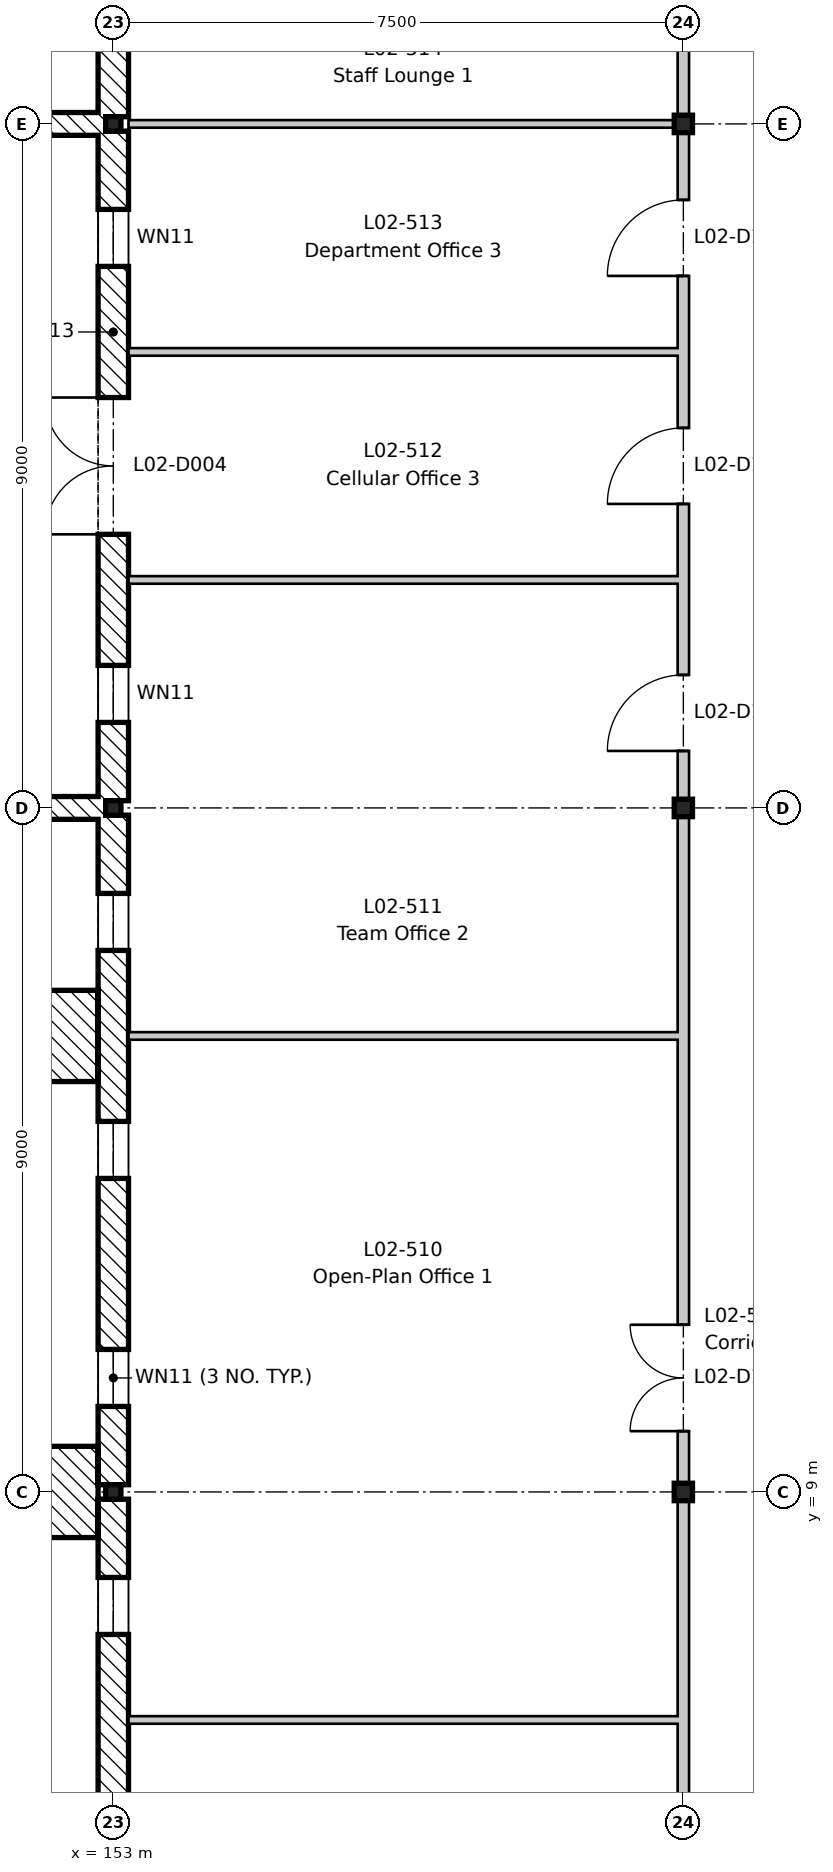
"""IFC4 building model, lengths in metres.
Left out: names, types, materials, properties, quantities, classifications, styles, units other than length and angle.
Written with IfcOpenShell. Run it as: python <this file> out.ifc"""

import sys

from ifc_helpers import new_model, si_unit, direction, frame, frame_2d, origin, origin_2d, place, context, subcontext, project, spatial, rectangle, i_section, extrude, element, fill, save


model = new_model("IFC4")
c1 = context("Model", 3, precision=1e-05, world=origin(), true_north=direction((0.0, 1.0)))
c2 = subcontext(c1, "Body", "Model", "MODEL_VIEW")
j1 = project(units=[si_unit("LENGTHUNIT", "METRE"), si_unit("PLANEANGLEUNIT", "RADIAN")], contexts=[c1])
p1 = place(None, origin())
s1 = spatial("IfcSite", under=j1, at=p1, CompositionType="ELEMENT")
p2 = place(p1, origin())
s2 = spatial("IfcBuilding", under=s1, at=p2, CompositionType="ELEMENT")
p3 = place(p2, frame((0.0, 0.0, 9.9)))
s3 = spatial("IfcBuildingStorey", under=s2, at=p3, CompositionType="ELEMENT", Elevation=9.9)
for number, where, z_axis, x_axis in (
    (1, (153.0, 9.0, -0.2), (0.0, 0.0, 1.0), (1.0, 0.0, 0.0)),
    (2, (153.0, 18.0, -0.2), (0.0, 0.0, 1.0), (1.0, 0.0, 0.0)),
    (3, (153.0, 27.0, -0.2), (0.0, 0.0, 1.0), (1.0, 0.0, 0.0)),
):
    element("IfcColumn", number, at=place(p3, frame(where, z_axis=z_axis, x_axis=x_axis)), inside=s3, PredefinedType="COLUMN", context=c2, shape_type="SweptSolid", body=[
        extrude(i_section(OverallWidth=0.2, OverallDepth=0.19, WebThickness=0.007, FlangeThickness=0.01, FilletRadius=0.018, at=origin_2d()), origin(), (0.0, 0.0, 1.0), 4.45),
    ])
for number, where, z_axis, x_axis in (
    (4, (160.5, 9.0, -0.2), (0.0, 0.0, 1.0), (1.0, 0.0, 0.0)),
    (5, (160.5, 18.0, -0.2), (0.0, 0.0, 1.0), (1.0, 0.0, 0.0)),
    (6, (160.5, 27.0, -0.2), (0.0, 0.0, 1.0), (1.0, 0.0, 0.0)),
):
    element("IfcColumn", number, at=place(p3, frame(where, z_axis=z_axis, x_axis=x_axis)), inside=s3, PredefinedType="COLUMN", context=c2, shape_type="SweptSolid", body=[
        extrude(i_section(OverallWidth=0.24, OverallDepth=0.23, WebThickness=0.008, FlangeThickness=0.012, FilletRadius=0.021, at=origin_2d()), origin(), (0.0, 0.0, 1.0), 4.45),
    ])
p4 = place(p3, frame((153.0, 0.095, 0.0), z_axis=(0.0, 0.0, 1.0), x_axis=(0.0, 1.0, 0.0)))
e7 = element("IfcWall", 7, at=p4, inside=s3, PredefinedType="STANDARD", context=c2, shape_type="SweptSolid", body=[
    extrude(rectangle(XDim=8.81, YDim=0.4, at=frame_2d((4.405, 0.0))), origin(), (0.0, 0.0, 1.0), 3.85),
])
p5 = place(p4, frame((1.03, 0.0, 1.5)))
e8 = element("IfcOpeningElement", 8, at=p5, cuts=e7, PredefinedType="OPENING", context=c2, shape_type="SweptSolid", body=[
    extrude(rectangle(XDim=0.75, YDim=1.2, at=frame_2d((0.375, 0.6))), frame((0.0, 0.21, 0.0), z_axis=(0.0, -1.0, 0.0), x_axis=(1.0, 0.0, 0.0)), (0.0, 0.0, 1.0), 0.42),
])
p6 = place(p4, frame((4.03, 0.0, 1.5)))
e9 = element("IfcOpeningElement", 9, at=p6, cuts=e7, PredefinedType="OPENING", context=c2, shape_type="SweptSolid", body=[
    extrude(rectangle(XDim=0.75, YDim=1.2, at=frame_2d((0.375, 0.6))), frame((0.0, 0.21, 0.0), z_axis=(0.0, -1.0, 0.0), x_axis=(1.0, 0.0, 0.0)), (0.0, 0.0, 1.0), 0.42),
])
p7 = place(p4, frame((7.03, 0.0, 1.5)))
e10 = element("IfcOpeningElement", 10, at=p7, cuts=e7, PredefinedType="OPENING", context=c2, shape_type="SweptSolid", body=[
    extrude(rectangle(XDim=0.75, YDim=1.2, at=frame_2d((0.375, 0.6))), frame((0.0, 0.21, 0.0), z_axis=(0.0, -1.0, 0.0), x_axis=(1.0, 0.0, 0.0)), (0.0, 0.0, 1.0), 0.42),
])
p8 = place(p3, frame((153.0, 9.095, 0.0), z_axis=(0.0, 0.0, 1.0), x_axis=(0.0, 1.0, 0.0)))
e11 = element("IfcWall", 11, at=p8, inside=s3, PredefinedType="STANDARD", context=c2, shape_type="SweptSolid", body=[
    extrude(rectangle(XDim=8.81, YDim=0.4, at=frame_2d((4.405, 0.0))), origin(), (0.0, 0.0, 1.0), 3.85),
])
p9 = place(p8, frame((1.03, 0.0, 1.5)))
e12 = element("IfcOpeningElement", 12, at=p9, cuts=e11, PredefinedType="OPENING", context=c2, shape_type="SweptSolid", body=[
    extrude(rectangle(XDim=0.75, YDim=1.2, at=frame_2d((0.375, 0.6))), frame((0.0, 0.21, 0.0), z_axis=(0.0, -1.0, 0.0), x_axis=(1.0, 0.0, 0.0)), (0.0, 0.0, 1.0), 0.42),
])
p10 = place(p8, frame((4.03, 0.0, 1.5)))
e13 = element("IfcOpeningElement", 13, at=p10, cuts=e11, PredefinedType="OPENING", context=c2, shape_type="SweptSolid", body=[
    extrude(rectangle(XDim=0.75, YDim=1.2, at=frame_2d((0.375, 0.6))), frame((0.0, 0.21, 0.0), z_axis=(0.0, -1.0, 0.0), x_axis=(1.0, 0.0, 0.0)), (0.0, 0.0, 1.0), 0.42),
])
p11 = place(p8, frame((7.03, 0.0, 1.5)))
e14 = element("IfcOpeningElement", 14, at=p11, cuts=e11, PredefinedType="OPENING", context=c2, shape_type="SweptSolid", body=[
    extrude(rectangle(XDim=0.75, YDim=1.2, at=frame_2d((0.375, 0.6))), frame((0.0, 0.21, 0.0), z_axis=(0.0, -1.0, 0.0), x_axis=(1.0, 0.0, 0.0)), (0.0, 0.0, 1.0), 0.42),
])
p12 = place(p3, frame((153.0, 18.095, 0.0), z_axis=(0.0, 0.0, 1.0), x_axis=(0.0, 1.0, 0.0)))
e15 = element("IfcWall", 15, at=p12, inside=s3, PredefinedType="STANDARD", context=c2, shape_type="SweptSolid", body=[
    extrude(rectangle(XDim=8.81, YDim=0.4, at=frame_2d((4.405, 0.0))), origin(), (0.0, 0.0, 1.0), 3.85),
])
p13 = place(p12, frame((3.505, 0.0, 0.0)))
e16 = element("IfcOpeningElement", 16, at=p13, cuts=e15, PredefinedType="OPENING", context=c2, shape_type="SweptSolid", body=[
    extrude(rectangle(XDim=1.8, YDim=2.4, at=frame_2d((0.9, 1.2))), frame((0.0, 0.21, 0.0), z_axis=(0.0, -1.0, 0.0), x_axis=(1.0, 0.0, 0.0)), (0.0, 0.0, 1.0), 0.42),
])
p14 = place(p12, frame((1.03, 0.0, 1.5)))
e17 = element("IfcOpeningElement", 17, at=p14, cuts=e15, PredefinedType="OPENING", context=c2, shape_type="SweptSolid", body=[
    extrude(rectangle(XDim=0.75, YDim=1.2, at=frame_2d((0.375, 0.6))), frame((0.0, 0.21, 0.0), z_axis=(0.0, -1.0, 0.0), x_axis=(1.0, 0.0, 0.0)), (0.0, 0.0, 1.0), 0.42),
])
p15 = place(p12, frame((7.03, 0.0, 1.5)))
e18 = element("IfcOpeningElement", 18, at=p15, cuts=e15, PredefinedType="OPENING", context=c2, shape_type="SweptSolid", body=[
    extrude(rectangle(XDim=0.75, YDim=1.2, at=frame_2d((0.375, 0.6))), frame((0.0, 0.21, 0.0), z_axis=(0.0, -1.0, 0.0), x_axis=(1.0, 0.0, 0.0)), (0.0, 0.0, 1.0), 0.42),
])
p16 = place(p3, frame((153.0, 27.095, 0.0), z_axis=(0.0, 0.0, 1.0), x_axis=(0.0, 1.0, 0.0)))
e19 = element("IfcWall", 19, at=p16, inside=s3, PredefinedType="STANDARD", context=c2, shape_type="SweptSolid", body=[
    extrude(rectangle(XDim=8.81, YDim=0.4, at=frame_2d((4.405, 0.0))), origin(), (0.0, 0.0, 1.0), 3.85),
])
p17 = place(p16, frame((3.505, 0.0, 0.0)))
e20 = element("IfcOpeningElement", 20, at=p17, cuts=e19, PredefinedType="OPENING", context=c2, shape_type="SweptSolid", body=[
    extrude(rectangle(XDim=1.8, YDim=2.4, at=frame_2d((0.9, 1.2))), frame((0.0, 0.21, 0.0), z_axis=(0.0, -1.0, 0.0), x_axis=(1.0, 0.0, 0.0)), (0.0, 0.0, 1.0), 0.42),
])
p18 = place(p16, frame((1.03, 0.0, 1.5)))
e21 = element("IfcOpeningElement", 21, at=p18, cuts=e19, PredefinedType="OPENING", context=c2, shape_type="SweptSolid", body=[
    extrude(rectangle(XDim=0.75, YDim=1.2, at=frame_2d((0.375, 0.6))), frame((0.0, 0.21, 0.0), z_axis=(0.0, -1.0, 0.0), x_axis=(1.0, 0.0, 0.0)), (0.0, 0.0, 1.0), 0.42),
])
p19 = place(p16, frame((7.03, 0.0, 1.5)))
e22 = element("IfcOpeningElement", 22, at=p19, cuts=e19, PredefinedType="OPENING", context=c2, shape_type="SweptSolid", body=[
    extrude(rectangle(XDim=0.75, YDim=1.2, at=frame_2d((0.375, 0.6))), frame((0.0, 0.21, 0.0), z_axis=(0.0, -1.0, 0.0), x_axis=(1.0, 0.0, 0.0)), (0.0, 0.0, 1.0), 0.42),
])
for number, where, z_axis, x_axis in (
    (23, (152.2, 8.4, 0.0), (0.0, 0.0, 1.0), (0.0, 1.0, 0.0)),
    (24, (152.2, 14.4, 0.0), (0.0, 0.0, 1.0), (0.0, 1.0, 0.0)),
):
    element("IfcWall", number, at=place(p3, frame(where, z_axis=z_axis, x_axis=x_axis)), inside=s3, PredefinedType="STANDARD", context=c2, shape_type="SweptSolid", body=[
        extrude(rectangle(XDim=1.2, YDim=1.2, at=frame_2d((0.6, 0.0))), origin(), (0.0, 0.0, 1.0), 3.65),
    ])
for number, where, z_axis, x_axis in (
    (25, (152.9, 18.0, 0.0), (0.0, 0.0, 1.0), (-1.0, 0.0, 0.0)),
    (26, (152.9, 27.0, 0.0), (0.0, 0.0, 1.0), (-1.0, 0.0, 0.0)),
):
    element("IfcWall", number, at=place(p3, frame(where, z_axis=z_axis, x_axis=x_axis)), inside=s3, PredefinedType="STANDARD", context=c2, shape_type="SweptSolid", body=[
        extrude(rectangle(XDim=2.9, YDim=0.3, at=frame_2d((1.45, 0.0))), origin(), (0.0, 0.0, 1.0), 3.97),
    ])
for number, where, z_axis, x_axis in (
    (27, (153.2, 6.0, 0.0), (0.0, 0.0, 1.0), (1.0, 0.0, 0.0)),
    (28, (153.2, 15.0, 0.0), (0.0, 0.0, 1.0), (1.0, 0.0, 0.0)),
    (29, (153.2, 21.0, 0.0), (0.0, 0.0, 1.0), (1.0, 0.0, 0.0)),
    (30, (153.2, 24.0, 0.0), (0.0, 0.0, 1.0), (1.0, 0.0, 0.0)),
):
    element("IfcWall", number, at=place(p3, frame(where, z_axis=z_axis, x_axis=x_axis)), inside=s3, PredefinedType="PARTITIONING", context=c2, shape_type="SweptSolid", body=[
        extrude(rectangle(XDim=7.225, YDim=0.1, at=frame_2d((3.613, 0.0))), origin(), (0.0, 0.0, 1.0), 4.25),
    ])
p20 = place(p3, frame((153.2, 27.0, 0.0), z_axis=(0.0, 0.0, 1.0), x_axis=(1.0, 0.0, 0.0)))
e31 = element("IfcWall", 31, at=p20, inside=s3, PredefinedType="PARTITIONING", context=c2, shape_type="SweptSolid", body=[
    extrude(rectangle(XDim=7.225, YDim=0.1, at=frame_2d((3.613, 0.0))), origin(), (0.0, 0.0, 1.0), 3.9),
])
p21 = place(p3, frame((160.5, -8.8, 0.0), z_axis=(0.0, 0.0, 1.0), x_axis=(0.0, 1.0, 0.0)))
e32 = element("IfcWall", 32, at=p21, inside=s3, PredefinedType="PARTITIONING", context=c2, shape_type="SweptSolid", body=[
    extrude(rectangle(XDim=62.6, YDim=0.15, at=frame_2d((31.3, 0.0))), origin(), (0.0, 0.0, 1.0), 3.73),
])
p22 = place(p21, frame((0.8, 0.0, 0.0)))
e33 = element("IfcOpeningElement", 33, at=p22, cuts=e32, PredefinedType="OPENING", context=c2, shape_type="SweptSolid", body=[
    extrude(rectangle(XDim=1.0, YDim=2.1, at=frame_2d((0.5, 1.05))), frame((0.0, 0.085, 0.0), z_axis=(0.0, -1.0, 0.0), x_axis=(1.0, 0.0, 0.0)), (0.0, 0.0, 1.0), 0.17),
])
p23 = place(p21, frame((5.3, 0.0, 0.0)))
e34 = element("IfcOpeningElement", 34, at=p23, cuts=e32, PredefinedType="OPENING", context=c2, shape_type="SweptSolid", body=[
    extrude(rectangle(XDim=1.0, YDim=2.1, at=frame_2d((0.5, 1.05))), frame((0.0, 0.085, 0.0), z_axis=(0.0, -1.0, 0.0), x_axis=(1.0, 0.0, 0.0)), (0.0, 0.0, 1.0), 0.17),
])
p24 = place(p21, frame((9.8, 0.0, 0.0)))
e35 = element("IfcOpeningElement", 35, at=p24, cuts=e32, PredefinedType="OPENING", context=c2, shape_type="SweptSolid", body=[
    extrude(rectangle(XDim=1.0, YDim=2.1, at=frame_2d((0.5, 1.05))), frame((0.0, 0.085, 0.0), z_axis=(0.0, -1.0, 0.0), x_axis=(1.0, 0.0, 0.0)), (0.0, 0.0, 1.0), 0.17),
])
p25 = place(p21, frame((12.8, 0.0, 0.0)))
e36 = element("IfcOpeningElement", 36, at=p25, cuts=e32, PredefinedType="OPENING", context=c2, shape_type="SweptSolid", body=[
    extrude(rectangle(XDim=1.0, YDim=2.1, at=frame_2d((0.5, 1.05))), frame((0.0, 0.085, 0.0), z_axis=(0.0, -1.0, 0.0), x_axis=(1.0, 0.0, 0.0)), (0.0, 0.0, 1.0), 0.17),
])
p26 = place(p21, frame((18.6, 0.0, 0.0)))
e37 = element("IfcOpeningElement", 37, at=p26, cuts=e32, PredefinedType="OPENING", context=c2, shape_type="SweptSolid", body=[
    extrude(rectangle(XDim=1.4, YDim=2.1, at=frame_2d((0.7, 1.05))), frame((0.0, 0.085, 0.0), z_axis=(0.0, -1.0, 0.0), x_axis=(1.0, 0.0, 0.0)), (0.0, 0.0, 1.0), 0.17),
])
p27 = place(p21, frame((27.55, 0.0, 0.0)))
e38 = element("IfcOpeningElement", 38, at=p27, cuts=e32, PredefinedType="OPENING", context=c2, shape_type="SweptSolid", body=[
    extrude(rectangle(XDim=1.0, YDim=2.1, at=frame_2d((0.5, 1.05))), frame((0.0, 0.085, 0.0), z_axis=(0.0, -1.0, 0.0), x_axis=(1.0, 0.0, 0.0)), (0.0, 0.0, 1.0), 0.17),
])
p28 = place(p21, frame((30.8, 0.0, 0.0)))
e39 = element("IfcOpeningElement", 39, at=p28, cuts=e32, PredefinedType="OPENING", context=c2, shape_type="SweptSolid", body=[
    extrude(rectangle(XDim=1.0, YDim=2.1, at=frame_2d((0.5, 1.05))), frame((0.0, 0.085, 0.0), z_axis=(0.0, -1.0, 0.0), x_axis=(1.0, 0.0, 0.0)), (0.0, 0.0, 1.0), 0.17),
])
p29 = place(p21, frame((33.8, 0.0, 0.0)))
e40 = element("IfcOpeningElement", 40, at=p29, cuts=e32, PredefinedType="OPENING", context=c2, shape_type="SweptSolid", body=[
    extrude(rectangle(XDim=1.0, YDim=2.1, at=frame_2d((0.5, 1.05))), frame((0.0, 0.085, 0.0), z_axis=(0.0, -1.0, 0.0), x_axis=(1.0, 0.0, 0.0)), (0.0, 0.0, 1.0), 0.17),
])
p30 = place(p21, frame((38.3, 0.0, 0.0)))
e41 = element("IfcOpeningElement", 41, at=p30, cuts=e32, PredefinedType="OPENING", context=c2, shape_type="SweptSolid", body=[
    extrude(rectangle(XDim=1.0, YDim=2.1, at=frame_2d((0.5, 1.05))), frame((0.0, 0.085, 0.0), z_axis=(0.0, -1.0, 0.0), x_axis=(1.0, 0.0, 0.0)), (0.0, 0.0, 1.0), 0.17),
])
p31 = place(p21, frame((42.8, 0.0, 0.0)))
e42 = element("IfcOpeningElement", 42, at=p31, cuts=e32, PredefinedType="OPENING", context=c2, shape_type="SweptSolid", body=[
    extrude(rectangle(XDim=1.0, YDim=2.1, at=frame_2d((0.5, 1.05))), frame((0.0, 0.085, 0.0), z_axis=(0.0, -1.0, 0.0), x_axis=(1.0, 0.0, 0.0)), (0.0, 0.0, 1.0), 0.17),
])
p32 = place(p21, frame((45.8, 0.0, 0.0)))
e43 = element("IfcOpeningElement", 43, at=p32, cuts=e32, PredefinedType="OPENING", context=c2, shape_type="SweptSolid", body=[
    extrude(rectangle(XDim=1.0, YDim=2.1, at=frame_2d((0.5, 1.05))), frame((0.0, 0.085, 0.0), z_axis=(0.0, -1.0, 0.0), x_axis=(1.0, 0.0, 0.0)), (0.0, 0.0, 1.0), 0.17),
])
p33 = place(p21, frame((50.3, 0.0, 0.0)))
e44 = element("IfcOpeningElement", 44, at=p33, cuts=e32, PredefinedType="OPENING", context=c2, shape_type="SweptSolid", body=[
    extrude(rectangle(XDim=1.0, YDim=2.1, at=frame_2d((0.5, 1.05))), frame((0.0, 0.085, 0.0), z_axis=(0.0, -1.0, 0.0), x_axis=(1.0, 0.0, 0.0)), (0.0, 0.0, 1.0), 0.17),
])
p34 = place(p21, frame((54.8, 0.0, 0.0)))
e45 = element("IfcOpeningElement", 45, at=p34, cuts=e32, PredefinedType="OPENING", context=c2, shape_type="SweptSolid", body=[
    extrude(rectangle(XDim=1.0, YDim=2.1, at=frame_2d((0.5, 1.05))), frame((0.0, 0.085, 0.0), z_axis=(0.0, -1.0, 0.0), x_axis=(1.0, 0.0, 0.0)), (0.0, 0.0, 1.0), 0.17),
])
p35 = place(p21, frame((57.8, 0.0, 0.0)))
e46 = element("IfcOpeningElement", 46, at=p35, cuts=e32, PredefinedType="OPENING", context=c2, shape_type="SweptSolid", body=[
    extrude(rectangle(XDim=1.0, YDim=2.1, at=frame_2d((0.5, 1.05))), frame((0.0, 0.085, 0.0), z_axis=(0.0, -1.0, 0.0), x_axis=(1.0, 0.0, 0.0)), (0.0, 0.0, 1.0), 0.17),
])
p36 = place(p21, frame((60.8, 0.0, 0.0)))
e47 = element("IfcOpeningElement", 47, at=p36, cuts=e32, PredefinedType="OPENING", context=c2, shape_type="SweptSolid", body=[
    extrude(rectangle(XDim=1.0, YDim=2.1, at=frame_2d((0.5, 1.05))), frame((0.0, 0.085, 0.0), z_axis=(0.0, -1.0, 0.0), x_axis=(1.0, 0.0, 0.0)), (0.0, 0.0, 1.0), 0.17),
])
p37 = place(p7, origin())
e48 = element("IfcWindow", 48, at=p37, inside=s3, PartitioningType="SINGLE_PANEL", PredefinedType="WINDOW", context=c2, shape_type="SweptSolid", body=[
    extrude(rectangle(XDim=0.75, YDim=1.2, at=frame_2d((0.375, 0.6))), frame((0.0, -0.12, 0.0), z_axis=(0.0, -1.0, 0.0), x_axis=(1.0, 0.0, 0.0)), (0.0, 0.0, 1.0), 0.06),
])
fill(e10, e48)
p38 = place(p9, origin())
e49 = element("IfcWindow", 49, at=p38, inside=s3, PartitioningType="SINGLE_PANEL", PredefinedType="WINDOW", context=c2, shape_type="SweptSolid", body=[
    extrude(rectangle(XDim=0.75, YDim=1.2, at=frame_2d((0.375, 0.6))), frame((0.0, -0.12, 0.0), z_axis=(0.0, -1.0, 0.0), x_axis=(1.0, 0.0, 0.0)), (0.0, 0.0, 1.0), 0.06),
])
fill(e12, e49)
p39 = place(p10, origin())
e50 = element("IfcWindow", 50, at=p39, inside=s3, PartitioningType="SINGLE_PANEL", PredefinedType="WINDOW", context=c2, shape_type="SweptSolid", body=[
    extrude(rectangle(XDim=0.75, YDim=1.2, at=frame_2d((0.375, 0.6))), frame((0.0, -0.12, 0.0), z_axis=(0.0, -1.0, 0.0), x_axis=(1.0, 0.0, 0.0)), (0.0, 0.0, 1.0), 0.06),
])
fill(e13, e50)
p40 = place(p11, origin())
e51 = element("IfcWindow", 51, at=p40, inside=s3, PartitioningType="SINGLE_PANEL", PredefinedType="WINDOW", context=c2, shape_type="SweptSolid", body=[
    extrude(rectangle(XDim=0.75, YDim=1.2, at=frame_2d((0.375, 0.6))), frame((0.0, -0.12, 0.0), z_axis=(0.0, -1.0, 0.0), x_axis=(1.0, 0.0, 0.0)), (0.0, 0.0, 1.0), 0.06),
])
fill(e14, e51)
p41 = place(p13, origin())
e52 = element("IfcDoor", 52, at=p41, inside=s3, OperationType="DOUBLE_DOOR_SINGLE_SWING", PredefinedType="DOOR", context=c2, shape_type="SweptSolid", body=[
    extrude(rectangle(XDim=1.8, YDim=2.4, at=frame_2d((0.9, 1.2))), frame((0.0, 0.025, 0.0), z_axis=(0.0, -1.0, 0.0), x_axis=(1.0, 0.0, 0.0)), (0.0, 0.0, 1.0), 0.05),
])
fill(e16, e52)
p42 = place(p14, origin())
e53 = element("IfcWindow", 53, at=p42, inside=s3, PartitioningType="SINGLE_PANEL", PredefinedType="WINDOW", context=c2, shape_type="SweptSolid", body=[
    extrude(rectangle(XDim=0.75, YDim=1.2, at=frame_2d((0.375, 0.6))), frame((0.0, -0.12, 0.0), z_axis=(0.0, -1.0, 0.0), x_axis=(1.0, 0.0, 0.0)), (0.0, 0.0, 1.0), 0.06),
])
fill(e17, e53)
p43 = place(p15, origin())
e54 = element("IfcWindow", 54, at=p43, inside=s3, PartitioningType="SINGLE_PANEL", PredefinedType="WINDOW", context=c2, shape_type="SweptSolid", body=[
    extrude(rectangle(XDim=0.75, YDim=1.2, at=frame_2d((0.375, 0.6))), frame((0.0, -0.12, 0.0), z_axis=(0.0, -1.0, 0.0), x_axis=(1.0, 0.0, 0.0)), (0.0, 0.0, 1.0), 0.06),
])
fill(e18, e54)
p44 = place(p26, origin())
e55 = element("IfcDoor", 55, at=p44, inside=s3, OperationType="DOUBLE_DOOR_SINGLE_SWING", PredefinedType="DOOR", context=c2, shape_type="SweptSolid", body=[
    extrude(rectangle(XDim=1.4, YDim=2.1, at=frame_2d((0.7, 1.05))), frame((0.0, 0.025, 0.0), z_axis=(0.0, -1.0, 0.0), x_axis=(1.0, 0.0, 0.0)), (0.0, 0.0, 1.0), 0.05),
])
fill(e37, e55)
p45 = place(p27, origin())
e56 = element("IfcDoor", 56, at=p45, inside=s3, OperationType="SINGLE_SWING_LEFT", PredefinedType="DOOR", context=c2, shape_type="SweptSolid", body=[
    extrude(rectangle(XDim=1.0, YDim=2.1, at=frame_2d((0.5, 1.05))), frame((0.0, 0.025, 0.0), z_axis=(0.0, -1.0, 0.0), x_axis=(1.0, 0.0, 0.0)), (0.0, 0.0, 1.0), 0.05),
])
fill(e38, e56)
p46 = place(p28, origin())
e57 = element("IfcDoor", 57, at=p46, inside=s3, OperationType="SINGLE_SWING_LEFT", PredefinedType="DOOR", context=c2, shape_type="SweptSolid", body=[
    extrude(rectangle(XDim=1.0, YDim=2.1, at=frame_2d((0.5, 1.05))), frame((0.0, 0.025, 0.0), z_axis=(0.0, -1.0, 0.0), x_axis=(1.0, 0.0, 0.0)), (0.0, 0.0, 1.0), 0.05),
])
fill(e39, e57)
p47 = place(p29, origin())
e58 = element("IfcDoor", 58, at=p47, inside=s3, OperationType="SINGLE_SWING_LEFT", PredefinedType="DOOR", context=c2, shape_type="SweptSolid", body=[
    extrude(rectangle(XDim=1.0, YDim=2.1, at=frame_2d((0.5, 1.05))), frame((0.0, 0.025, 0.0), z_axis=(0.0, -1.0, 0.0), x_axis=(1.0, 0.0, 0.0)), (0.0, 0.0, 1.0), 0.05),
])
fill(e40, e58)
save(model, sys.argv[1])
